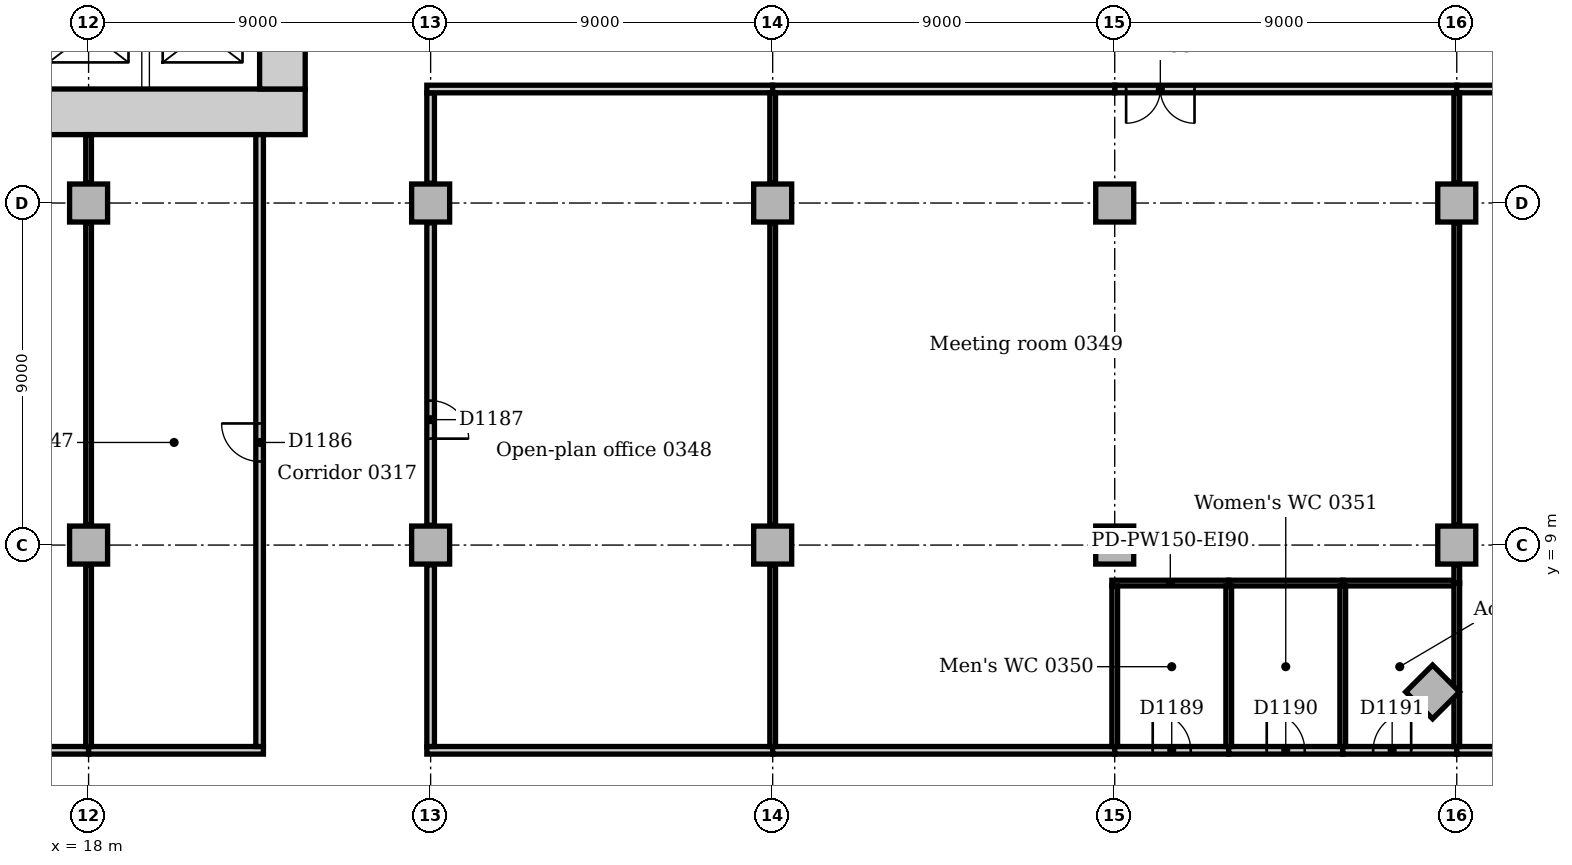
"""IFC4 building model, lengths in metres.
Left out: names, types, materials, properties, quantities, classifications, styles, units other than length and angle.
Written with IfcOpenShell. Run it as: python <this file> out.ifc"""

import sys

from ifc_helpers import new_model, si_unit, direction, frame, frame_2d, origin, origin_2d, place, context, subcontext, project, spatial, rectangle, extrude, element, fill, save


model = new_model("IFC4")
c1 = context("Model", 3, precision=1e-05, world=origin(), true_north=direction((0.0, 1.0)))
c2 = subcontext(c1, "Body", "Model", "MODEL_VIEW")
j1 = project(units=[si_unit("LENGTHUNIT", "METRE"), si_unit("PLANEANGLEUNIT", "RADIAN")], contexts=[c1])
p1 = place(None, origin())
s1 = spatial("IfcSite", under=j1, at=p1, CompositionType="ELEMENT")
p2 = place(p1, origin())
s2 = spatial("IfcBuilding", under=s1, at=p2, CompositionType="ELEMENT")
p3 = place(p2, frame((0.0, 0.0, 16.0)))
s3 = spatial("IfcBuildingStorey", under=s2, at=p3, CompositionType="ELEMENT", Elevation=16.0)
p4 = place(p3, frame((3.9, 20.4, 0.0), z_axis=(0.0, 0.0, 1.0), x_axis=(1.0, 0.0, 0.0)))
e1 = element("IfcWall", 1, at=p4, inside=s3, PredefinedType="SOLIDWALL", context=c2, shape_type="SweptSolid", body=[
    extrude(rectangle(XDim=19.8, YDim=1.2, at=frame_2d((9.9, 0.0))), origin(), (0.0, 0.0, 1.0), 5.0),
])
p5 = place(p3, frame((23.1, 21.0, 0.0), z_axis=(0.0, 0.0, 1.0), x_axis=(0.0, 1.0, 0.0)))
e2 = element("IfcWall", 2, at=p5, inside=s3, PredefinedType="SOLIDWALL", context=c2, shape_type="SweptSolid", body=[
    extrude(rectangle(XDim=10.5, YDim=1.2, at=frame_2d((5.25, 0.0))), origin(), (0.0, 0.0, 1.0), 5.0),
])
p6 = place(p5, frame((4.35, 0.0, 0.0)))
e3 = element("IfcOpeningElement", 3, at=p6, cuts=e2, PredefinedType="OPENING", context=c2, shape_type="SweptSolid", body=[
    extrude(rectangle(XDim=1.8, YDim=2.1, at=frame_2d((0.9, 1.05))), frame((0.0, 0.61, 0.0), z_axis=(0.0, -1.0, 0.0), x_axis=(1.0, 0.0, 0.0)), (0.0, 0.0, 1.0), 1.22),
])
for number, where, z_axis, x_axis in (
    (4, (53.364, 5.136, 0.0), (0.0, 0.0, 1.0), (0.707, 0.707, 0.0)),
    (5, (18.0, 9.0, 0.0), (0.0, 0.0, 1.0), (1.0, 0.0, 0.0)),
    (6, (18.0, 18.0, 0.0), (0.0, 0.0, 1.0), (1.0, 0.0, 0.0)),
    (7, (27.0, 9.0, 0.0), (0.0, 0.0, 1.0), (1.0, 0.0, 0.0)),
    (8, (27.0, 18.0, 0.0), (0.0, 0.0, 1.0), (1.0, 0.0, 0.0)),
    (9, (36.0, 9.0, 0.0), (0.0, 0.0, 1.0), (1.0, 0.0, 0.0)),
    (10, (36.0, 18.0, 0.0), (0.0, 0.0, 1.0), (1.0, 0.0, 0.0)),
    (11, (45.0, 9.0, 0.0), (0.0, 0.0, 1.0), (1.0, 0.0, 0.0)),
    (12, (45.0, 18.0, 0.0), (0.0, 0.0, 1.0), (1.0, 0.0, 0.0)),
    (13, (54.0, 9.0, 0.0), (0.0, 0.0, 1.0), (1.0, 0.0, 0.0)),
    (14, (54.0, 18.0, 0.0), (0.0, 0.0, 1.0), (1.0, 0.0, 0.0)),
):
    element("IfcColumn", number, at=place(p3, frame(where, z_axis=z_axis, x_axis=x_axis)), inside=s3, PredefinedType="COLUMN", context=c2, shape_type="SweptSolid", body=[
        extrude(rectangle(XDim=1.0, YDim=1.0, at=origin_2d()), origin(), (0.0, 0.0, 1.0), 4.7),
    ])
p7 = place(p3, frame((9.0, 3.6, 0.0), z_axis=(0.0, 0.0, 1.0), x_axis=(1.0, 0.0, 0.0)))
e15 = element("IfcWall", 15, at=p7, inside=s3, PredefinedType="PARTITIONING", context=c2, shape_type="SweptSolid", body=[
    extrude(rectangle(XDim=9.0, YDim=0.2, at=frame_2d((4.5, 0.0))), origin(), (0.0, 0.0, 1.0), 4.7),
])
p8 = place(p7, frame((4.0, 0.0, 0.0)))
e16 = element("IfcOpeningElement", 16, at=p8, cuts=e15, PredefinedType="OPENING", context=c2, shape_type="SweptSolid", body=[
    extrude(rectangle(XDim=1.0, YDim=2.1, at=frame_2d((0.5, 1.05))), frame((0.0, 0.11, 0.0), z_axis=(0.0, -1.0, 0.0), x_axis=(1.0, 0.0, 0.0)), (0.0, 0.0, 1.0), 0.22),
])
p9 = place(p3, frame((18.0, 3.6, 0.0), z_axis=(0.0, 0.0, 1.0), x_axis=(1.0, 0.0, 0.0)))
e17 = element("IfcWall", 17, at=p9, inside=s3, PredefinedType="PARTITIONING", context=c2, shape_type="SweptSolid", body=[
    extrude(rectangle(XDim=4.6, YDim=0.2, at=frame_2d((2.3, 0.0))), origin(), (0.0, 0.0, 1.0), 4.7),
])
p10 = place(p3, frame((26.9, 3.6, 0.0), z_axis=(0.0, 0.0, 1.0), x_axis=(1.0, 0.0, 0.0)))
e18 = element("IfcWall", 18, at=p10, inside=s3, PredefinedType="PARTITIONING", context=c2, shape_type="SweptSolid", body=[
    extrude(rectangle(XDim=9.1, YDim=0.2, at=frame_2d((4.55, 0.0))), origin(), (0.0, 0.0, 1.0), 4.7),
])
p11 = place(p3, frame((36.0, 3.6, 0.0), z_axis=(0.0, 0.0, 1.0), x_axis=(1.0, 0.0, 0.0)))
e19 = element("IfcWall", 19, at=p11, inside=s3, PredefinedType="PARTITIONING", context=c2, shape_type="SweptSolid", body=[
    extrude(rectangle(XDim=9.0, YDim=0.2, at=frame_2d((4.5, 0.0))), origin(), (0.0, 0.0, 1.0), 4.7),
])
p12 = place(p3, frame((45.0, 3.6, 0.0), z_axis=(0.0, 0.0, 1.0), x_axis=(1.0, 0.0, 0.0)))
e20 = element("IfcWall", 20, at=p12, inside=s3, PredefinedType="PARTITIONING", context=c2, shape_type="SweptSolid", body=[
    extrude(rectangle(XDim=3.0, YDim=0.2, at=frame_2d((1.5, 0.0))), origin(), (0.0, 0.0, 1.0), 4.7),
])
p13 = place(p12, frame((1.0, 0.0, 0.0)))
e21 = element("IfcOpeningElement", 21, at=p13, cuts=e20, PredefinedType="OPENING", context=c2, shape_type="SweptSolid", body=[
    extrude(rectangle(XDim=1.0, YDim=2.1, at=frame_2d((0.5, 1.05))), frame((0.0, 0.11, 0.0), z_axis=(0.0, -1.0, 0.0), x_axis=(1.0, 0.0, 0.0)), (0.0, 0.0, 1.0), 0.22),
])
p14 = place(p3, frame((48.0, 3.6, 0.0), z_axis=(0.0, 0.0, 1.0), x_axis=(1.0, 0.0, 0.0)))
e22 = element("IfcWall", 22, at=p14, inside=s3, PredefinedType="PARTITIONING", context=c2, shape_type="SweptSolid", body=[
    extrude(rectangle(XDim=3.0, YDim=0.2, at=frame_2d((1.5, 0.0))), origin(), (0.0, 0.0, 1.0), 4.7),
])
p15 = place(p14, frame((1.0, 0.0, 0.0)))
e23 = element("IfcOpeningElement", 23, at=p15, cuts=e22, PredefinedType="OPENING", context=c2, shape_type="SweptSolid", body=[
    extrude(rectangle(XDim=1.0, YDim=2.1, at=frame_2d((0.5, 1.05))), frame((0.0, 0.11, 0.0), z_axis=(0.0, -1.0, 0.0), x_axis=(1.0, 0.0, 0.0)), (0.0, 0.0, 1.0), 0.22),
])
p16 = place(p3, frame((51.0, 3.6, 0.0), z_axis=(0.0, 0.0, 1.0), x_axis=(1.0, 0.0, 0.0)))
e24 = element("IfcWall", 24, at=p16, inside=s3, PredefinedType="PARTITIONING", context=c2, shape_type="SweptSolid", body=[
    extrude(rectangle(XDim=3.0, YDim=0.2, at=frame_2d((1.5, 0.0))), origin(), (0.0, 0.0, 1.0), 4.7),
])
p17 = place(p16, frame((0.8, 0.0, 0.0)))
e25 = element("IfcOpeningElement", 25, at=p17, cuts=e24, PredefinedType="OPENING", context=c2, shape_type="SweptSolid", body=[
    extrude(rectangle(XDim=1.0, YDim=2.1, at=frame_2d((0.5, 1.05))), frame((0.0, 0.11, 0.0), z_axis=(0.0, -1.0, 0.0), x_axis=(1.0, 0.0, 0.0)), (0.0, 0.0, 1.0), 0.22),
])
p18 = place(p3, frame((54.0, 3.6, 0.0), z_axis=(0.0, 0.0, 1.0), x_axis=(1.0, 0.0, 0.0)))
e26 = element("IfcWall", 26, at=p18, inside=s3, PredefinedType="PARTITIONING", context=c2, shape_type="SweptSolid", body=[
    extrude(rectangle(XDim=11.6, YDim=0.2, at=frame_2d((5.8, 0.0))), origin(), (0.0, 0.0, 1.0), 4.7),
])
p19 = place(p18, frame((5.5, 0.0, 0.0)))
e27 = element("IfcOpeningElement", 27, at=p19, cuts=e26, PredefinedType="OPENING", context=c2, shape_type="SweptSolid", body=[
    extrude(rectangle(XDim=1.0, YDim=2.1, at=frame_2d((0.5, 1.05))), frame((0.0, 0.11, 0.0), z_axis=(0.0, -1.0, 0.0), x_axis=(1.0, 0.0, 0.0)), (0.0, 0.0, 1.0), 0.22),
])
p20 = place(p3, frame((22.5, 3.7, 0.0), z_axis=(0.0, 0.0, 1.0), x_axis=(0.0, 1.0, 0.0)))
e28 = element("IfcWall", 28, at=p20, inside=s3, PredefinedType="PARTITIONING", context=c2, shape_type="SweptSolid", body=[
    extrude(rectangle(XDim=16.1, YDim=0.2, at=frame_2d((8.05, 0.0))), origin(), (0.0, 0.0, 1.0), 4.7),
])
p21 = place(p20, frame((7.5, 0.0, 0.0)))
e29 = element("IfcOpeningElement", 29, at=p21, cuts=e28, PredefinedType="OPENING", context=c2, shape_type="SweptSolid", body=[
    extrude(rectangle(XDim=1.0, YDim=2.1, at=frame_2d((0.5, 1.05))), frame((0.0, 0.11, 0.0), z_axis=(0.0, -1.0, 0.0), x_axis=(1.0, 0.0, 0.0)), (0.0, 0.0, 1.0), 0.22),
])
p22 = place(p3, frame((27.0, 3.7, 0.0), z_axis=(0.0, 0.0, 1.0), x_axis=(0.0, 1.0, 0.0)))
e30 = element("IfcWall", 30, at=p22, inside=s3, PredefinedType="PARTITIONING", context=c2, shape_type="SweptSolid", body=[
    extrude(rectangle(XDim=4.78, YDim=0.2, at=frame_2d((2.39, 0.0))), origin(), (0.0, 0.0, 1.0), 4.7),
])
p23 = place(p3, frame((27.0, 9.52, 0.0), z_axis=(0.0, 0.0, 1.0), x_axis=(0.0, 1.0, 0.0)))
e31 = element("IfcWall", 31, at=p23, inside=s3, PredefinedType="PARTITIONING", context=c2, shape_type="SweptSolid", body=[
    extrude(rectangle(XDim=7.96, YDim=0.2, at=frame_2d((3.98, 0.0))), origin(), (0.0, 0.0, 1.0), 4.7),
])
p24 = place(p23, frame((2.28, 0.0, 0.0)))
e32 = element("IfcOpeningElement", 32, at=p24, cuts=e31, PredefinedType="OPENING", context=c2, shape_type="SweptSolid", body=[
    extrude(rectangle(XDim=1.0, YDim=2.1, at=frame_2d((0.5, 1.05))), frame((0.0, 0.11, 0.0), z_axis=(0.0, -1.0, 0.0), x_axis=(1.0, 0.0, 0.0)), (0.0, 0.0, 1.0), 0.22),
])
p25 = place(p3, frame((27.0, 18.52, 0.0), z_axis=(0.0, 0.0, 1.0), x_axis=(0.0, 1.0, 0.0)))
e33 = element("IfcWall", 33, at=p25, inside=s3, PredefinedType="PARTITIONING", context=c2, shape_type="SweptSolid", body=[
    extrude(rectangle(XDim=2.38, YDim=0.2, at=frame_2d((1.19, 0.0))), origin(), (0.0, 0.0, 1.0), 4.7),
])
p26 = place(p3, frame((26.9, 21.0, 0.0), z_axis=(0.0, 0.0, 1.0), x_axis=(1.0, 0.0, 0.0)))
e34 = element("IfcWall", 34, at=p26, inside=s3, PredefinedType="PARTITIONING", context=c2, shape_type="SweptSolid", body=[
    extrude(rectangle(XDim=9.1, YDim=0.2, at=frame_2d((4.55, 0.0))), origin(), (0.0, 0.0, 1.0), 4.7),
])
p27 = place(p3, frame((45.0, 21.0, 0.0), z_axis=(0.0, 0.0, 1.0), x_axis=(1.0, 0.0, 0.0)))
e35 = element("IfcWall", 35, at=p27, inside=s3, PredefinedType="PARTITIONING", context=c2, shape_type="SweptSolid", body=[
    extrude(rectangle(XDim=9.0, YDim=0.2, at=frame_2d((4.5, 0.0))), origin(), (0.0, 0.0, 1.0), 4.7),
])
p28 = place(p27, frame((0.3, 0.0, 0.0)))
e36 = element("IfcOpeningElement", 36, at=p28, cuts=e35, PredefinedType="OPENING", context=c2, shape_type="SweptSolid", body=[
    extrude(rectangle(XDim=1.8, YDim=2.1, at=frame_2d((0.9, 1.05))), frame((0.0, 0.11, 0.0), z_axis=(0.0, -1.0, 0.0), x_axis=(1.0, 0.0, 0.0)), (0.0, 0.0, 1.0), 0.22),
])
p29 = place(p3, frame((36.0, 21.0, 0.0), z_axis=(0.0, 0.0, 1.0), x_axis=(1.0, 0.0, 0.0)))
e37 = element("IfcWall", 37, at=p29, inside=s3, PredefinedType="PARTITIONING", context=c2, shape_type="SweptSolid", body=[
    extrude(rectangle(XDim=9.0, YDim=0.2, at=frame_2d((4.5, 0.0))), origin(), (0.0, 0.0, 1.0), 4.7),
])
p30 = place(p3, frame((54.0, 21.0, 0.0), z_axis=(0.0, 0.0, 1.0), x_axis=(1.0, 0.0, 0.0)))
e38 = element("IfcWall", 38, at=p30, inside=s3, PredefinedType="PARTITIONING", context=c2, shape_type="SweptSolid", body=[
    extrude(rectangle(XDim=11.6, YDim=0.2, at=frame_2d((5.8, 0.0))), origin(), (0.0, 0.0, 1.0), 4.7),
])
p31 = place(p3, frame((18.0, 3.7, 0.0), z_axis=(0.0, 0.0, 1.0), x_axis=(0.0, 1.0, 0.0)))
e39 = element("IfcWall", 39, at=p31, inside=s3, PredefinedType="PARTITIONING", context=c2, shape_type="SweptSolid", body=[
    extrude(rectangle(XDim=4.78, YDim=0.15, at=frame_2d((2.39, 0.0))), origin(), (0.0, 0.0, 1.0), 4.7),
])
p32 = place(p3, frame((18.0, 9.52, 0.0), z_axis=(0.0, 0.0, 1.0), x_axis=(0.0, 1.0, 0.0)))
e40 = element("IfcWall", 40, at=p32, inside=s3, PredefinedType="PARTITIONING", context=c2, shape_type="SweptSolid", body=[
    extrude(rectangle(XDim=7.96, YDim=0.15, at=frame_2d((3.98, 0.0))), origin(), (0.0, 0.0, 1.0), 4.7),
])
p33 = place(p3, frame((18.0, 18.52, 0.0), z_axis=(0.0, 0.0, 1.0), x_axis=(0.0, 1.0, 0.0)))
e41 = element("IfcWall", 41, at=p33, inside=s3, PredefinedType="PARTITIONING", context=c2, shape_type="SweptSolid", body=[
    extrude(rectangle(XDim=1.28, YDim=0.15, at=frame_2d((0.64, 0.0))), origin(), (0.0, 0.0, 1.0), 4.7),
])
p34 = place(p3, frame((36.0, 3.7, 0.0), z_axis=(0.0, 0.0, 1.0), x_axis=(0.0, 1.0, 0.0)))
e42 = element("IfcWall", 42, at=p34, inside=s3, PredefinedType="PARTITIONING", context=c2, shape_type="SweptSolid", body=[
    extrude(rectangle(XDim=4.78, YDim=0.15, at=frame_2d((2.39, 0.0))), origin(), (0.0, 0.0, 1.0), 4.7),
])
p35 = place(p3, frame((36.0, 9.52, 0.0), z_axis=(0.0, 0.0, 1.0), x_axis=(0.0, 1.0, 0.0)))
e43 = element("IfcWall", 43, at=p35, inside=s3, PredefinedType="PARTITIONING", context=c2, shape_type="SweptSolid", body=[
    extrude(rectangle(XDim=7.96, YDim=0.15, at=frame_2d((3.98, 0.0))), origin(), (0.0, 0.0, 1.0), 4.7),
])
p36 = place(p3, frame((36.0, 18.52, 0.0), z_axis=(0.0, 0.0, 1.0), x_axis=(0.0, 1.0, 0.0)))
e44 = element("IfcWall", 44, at=p36, inside=s3, PredefinedType="PARTITIONING", context=c2, shape_type="SweptSolid", body=[
    extrude(rectangle(XDim=2.38, YDim=0.15, at=frame_2d((1.19, 0.0))), origin(), (0.0, 0.0, 1.0), 4.7),
])
p37 = place(p3, frame((44.925, 8.0, 0.0), z_axis=(0.0, 0.0, 1.0), x_axis=(1.0, 0.0, 0.0)))
e45 = element("IfcWall", 45, at=p37, inside=s3, PredefinedType="PARTITIONING", context=c2, shape_type="SweptSolid", body=[
    extrude(rectangle(XDim=3.075, YDim=0.15, at=frame_2d((1.538, 0.0))), origin(), (0.0, 0.0, 1.0), 4.7),
])
p38 = place(p3, frame((45.0, 3.7, 0.0), z_axis=(0.0, 0.0, 1.0), x_axis=(0.0, 1.0, 0.0)))
e46 = element("IfcWall", 46, at=p38, inside=s3, PredefinedType="PARTITIONING", context=c2, shape_type="SweptSolid", body=[
    extrude(rectangle(XDim=4.225, YDim=0.15, at=frame_2d((2.112, 0.0))), origin(), (0.0, 0.0, 1.0), 4.7),
])
p39 = place(p3, frame((48.0, 8.0, 0.0), z_axis=(0.0, 0.0, 1.0), x_axis=(1.0, 0.0, 0.0)))
e47 = element("IfcWall", 47, at=p39, inside=s3, PredefinedType="PARTITIONING", context=c2, shape_type="SweptSolid", body=[
    extrude(rectangle(XDim=3.0, YDim=0.15, at=frame_2d((1.5, 0.0))), origin(), (0.0, 0.0, 1.0), 4.7),
])
p40 = place(p3, frame((51.0, 8.0, 0.0), z_axis=(0.0, 0.0, 1.0), x_axis=(1.0, 0.0, 0.0)))
e48 = element("IfcWall", 48, at=p40, inside=s3, PredefinedType="PARTITIONING", context=c2, shape_type="SweptSolid", body=[
    extrude(rectangle(XDim=2.925, YDim=0.15, at=frame_2d((1.462, 0.0))), origin(), (0.0, 0.0, 1.0), 4.7),
])
p41 = place(p3, frame((54.0, 8.0, 0.0), z_axis=(0.0, 0.0, 1.0), x_axis=(0.0, 1.0, 0.0)))
e49 = element("IfcWall", 49, at=p41, inside=s3, PredefinedType="PARTITIONING", context=c2, shape_type="SweptSolid", body=[
    extrude(rectangle(XDim=0.48, YDim=0.15, at=frame_2d((0.24, 0.0))), origin(), (0.0, 0.0, 1.0), 4.7),
])
p42 = place(p3, frame((54.0, 9.52, 0.0), z_axis=(0.0, 0.0, 1.0), x_axis=(0.0, 1.0, 0.0)))
e50 = element("IfcWall", 50, at=p42, inside=s3, PredefinedType="PARTITIONING", context=c2, shape_type="SweptSolid", body=[
    extrude(rectangle(XDim=7.96, YDim=0.15, at=frame_2d((3.98, 0.0))), origin(), (0.0, 0.0, 1.0), 4.7),
])
p43 = place(p3, frame((54.0, 18.52, 0.0), z_axis=(0.0, 0.0, 1.0), x_axis=(0.0, 1.0, 0.0)))
e51 = element("IfcWall", 51, at=p43, inside=s3, PredefinedType="PARTITIONING", context=c2, shape_type="SweptSolid", body=[
    extrude(rectangle(XDim=2.38, YDim=0.15, at=frame_2d((1.19, 0.0))), origin(), (0.0, 0.0, 1.0), 4.7),
])
for number, where, z_axis, x_axis in (
    (52, (48.0, 3.7, 0.0), (0.0, 0.0, 1.0), (0.0, 1.0, 0.0)),
    (53, (51.0, 3.7, 0.0), (0.0, 0.0, 1.0), (0.0, 1.0, 0.0)),
):
    element("IfcWall", number, at=place(p3, frame(where, z_axis=z_axis, x_axis=x_axis)), inside=s3, PredefinedType="PARTITIONING", context=c2, shape_type="SweptSolid", body=[
        extrude(rectangle(XDim=4.225, YDim=0.15, at=frame_2d((2.112, 0.0))), origin(), (0.0, 0.0, 1.0), 4.7),
    ])
p44 = place(p3, frame((54.0, 3.7, 0.0), z_axis=(0.0, 0.0, 1.0), x_axis=(0.0, 1.0, 0.0)))
e54 = element("IfcWall", 54, at=p44, inside=s3, PredefinedType="PARTITIONING", context=c2, shape_type="SweptSolid", body=[
    extrude(rectangle(XDim=4.3, YDim=0.15, at=frame_2d((2.15, 0.0))), origin(), (0.0, 0.0, 1.0), 4.7),
])
p45 = place(p3, frame((19.5, 21.0, 0.0), z_axis=(0.0, 0.0, 1.0), x_axis=(0.0, 1.0, 0.0)))
e55 = element("IfcWall", 55, at=p45, inside=s3, PredefinedType="PARTITIONING", context=c2, shape_type="SweptSolid", body=[
    extrude(rectangle(XDim=2.9, YDim=0.2, at=frame_2d((1.45, 0.0))), origin(), (0.0, 0.0, 1.0), 4.7),
])
p46 = place(p21, origin())
e56 = element("IfcDoor", 56, at=p46, inside=s3, OperationType="SINGLE_SWING_RIGHT", PredefinedType="DOOR", context=c2, shape_type="SweptSolid", body=[
    extrude(rectangle(XDim=1.0, YDim=2.1, at=frame_2d((0.5, 1.05))), frame((0.0, 0.025, 0.0), z_axis=(0.0, -1.0, 0.0), x_axis=(1.0, 0.0, 0.0)), (0.0, 0.0, 1.0), 0.05),
])
fill(e29, e56)
p47 = place(p24, frame((1.0, 0.0, 0.0), z_axis=(0.0, 0.0, 1.0), x_axis=(-1.0, 0.0, 0.0)))
e57 = element("IfcDoor", 57, at=p47, inside=s3, OperationType="SINGLE_SWING_RIGHT", PredefinedType="DOOR", context=c2, shape_type="SweptSolid", body=[
    extrude(rectangle(XDim=1.0, YDim=2.1, at=frame_2d((0.5, 1.05))), frame((0.0, 0.025, 0.0), z_axis=(0.0, -1.0, 0.0), x_axis=(1.0, 0.0, 0.0)), (0.0, 0.0, 1.0), 0.05),
])
fill(e32, e57)
p48 = place(p28, frame((1.8, 0.0, 0.0), z_axis=(0.0, 0.0, 1.0), x_axis=(-1.0, 0.0, 0.0)))
e58 = element("IfcDoor", 58, at=p48, inside=s3, OperationType="DOUBLE_DOOR_SINGLE_SWING", PredefinedType="DOOR", context=c2, shape_type="SweptSolid", body=[
    extrude(rectangle(XDim=1.8, YDim=2.1, at=frame_2d((0.9, 1.05))), frame((0.0, 0.025, 0.0), z_axis=(0.0, -1.0, 0.0), x_axis=(1.0, 0.0, 0.0)), (0.0, 0.0, 1.0), 0.05),
])
fill(e36, e58)
p49 = place(p13, origin())
e59 = element("IfcDoor", 59, at=p49, inside=s3, OperationType="SINGLE_SWING_LEFT", PredefinedType="DOOR", context=c2, shape_type="SweptSolid", body=[
    extrude(rectangle(XDim=1.0, YDim=2.1, at=frame_2d((0.5, 1.05))), frame((0.0, 0.025, 0.0), z_axis=(0.0, -1.0, 0.0), x_axis=(1.0, 0.0, 0.0)), (0.0, 0.0, 1.0), 0.05),
])
fill(e21, e59)
p50 = place(p15, origin())
e60 = element("IfcDoor", 60, at=p50, inside=s3, OperationType="SINGLE_SWING_LEFT", PredefinedType="DOOR", context=c2, shape_type="SweptSolid", body=[
    extrude(rectangle(XDim=1.0, YDim=2.1, at=frame_2d((0.5, 1.05))), frame((0.0, 0.025, 0.0), z_axis=(0.0, -1.0, 0.0), x_axis=(1.0, 0.0, 0.0)), (0.0, 0.0, 1.0), 0.05),
])
fill(e23, e60)
p51 = place(p17, origin())
e61 = element("IfcDoor", 61, at=p51, inside=s3, OperationType="SINGLE_SWING_RIGHT", PredefinedType="DOOR", context=c2, shape_type="SweptSolid", body=[
    extrude(rectangle(XDim=1.0, YDim=2.1, at=frame_2d((0.5, 1.05))), frame((0.0, 0.025, 0.0), z_axis=(0.0, -1.0, 0.0), x_axis=(1.0, 0.0, 0.0)), (0.0, 0.0, 1.0), 0.05),
])
fill(e25, e61)
save(model, sys.argv[1])
